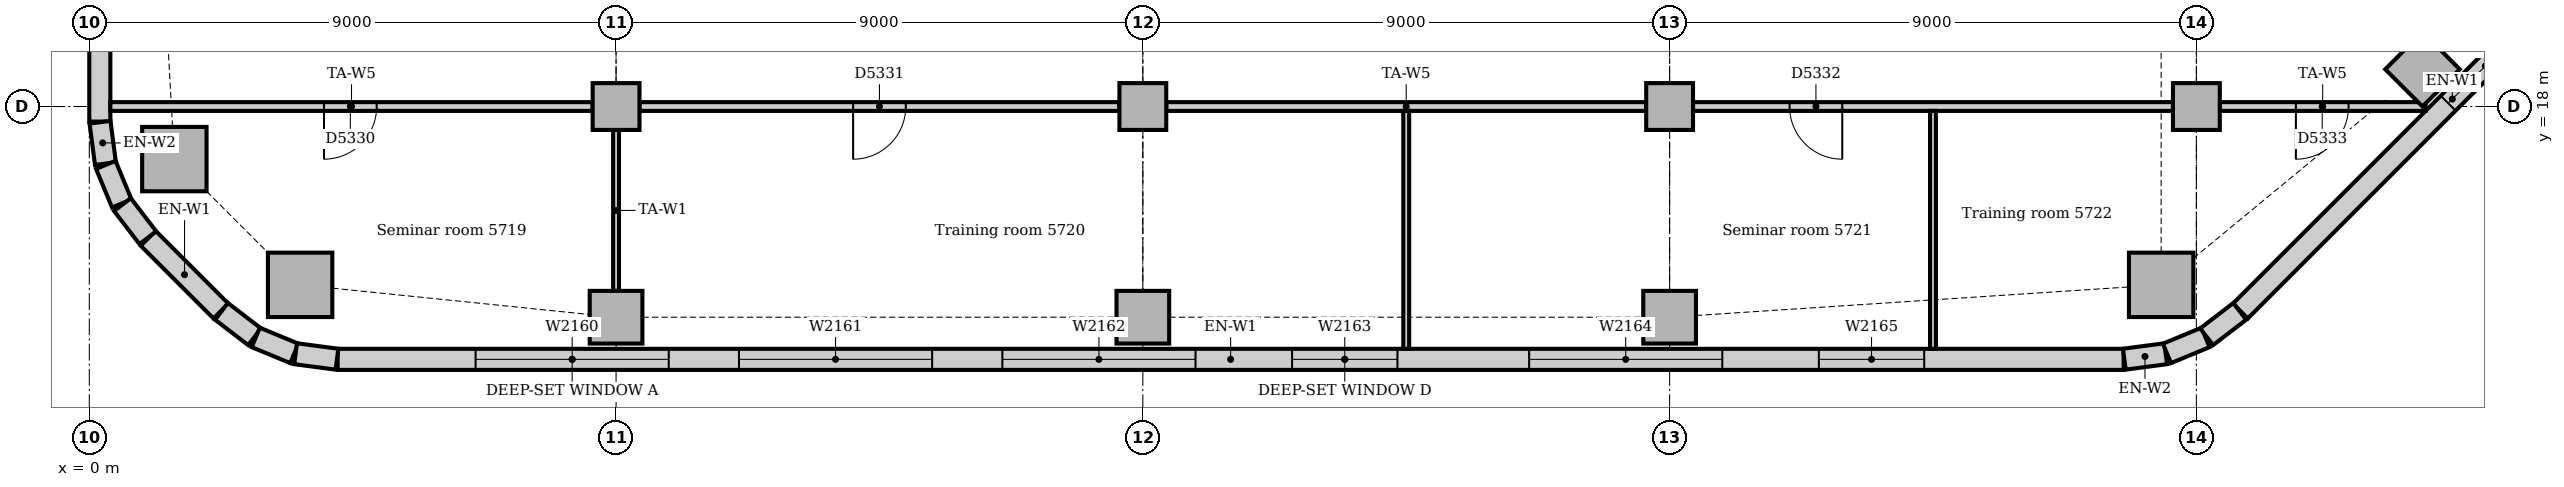
"""IFC4 building model, lengths in metres.
Left out: names, types, materials, properties, quantities, classifications, styles, units other than length and angle.
Written with IfcOpenShell. Run it as: python <this file> out.ifc"""

import sys

from ifc_helpers import new_model, si_unit, direction, frame, frame_2d, origin, origin_2d, place, context, subcontext, project, spatial, rectangle, extrude, element, fill, save


model = new_model("IFC4")
c1 = context("Model", 3, precision=1e-05, world=origin(), true_north=direction((0.0, 1.0)))
c2 = subcontext(c1, "Body", "Model", "MODEL_VIEW")
j1 = project(units=[si_unit("LENGTHUNIT", "METRE"), si_unit("PLANEANGLEUNIT", "RADIAN")], contexts=[c1])
p1 = place(None, origin())
s1 = spatial("IfcSite", under=j1, at=p1, CompositionType="ELEMENT")
p2 = place(p1, origin())
s2 = spatial("IfcBuilding", under=s1, at=p2, CompositionType="ELEMENT")
p3 = place(p2, frame((0.0, 0.0, 238.0)))
s3 = spatial("IfcBuildingStorey", under=s2, at=p3, CompositionType="ELEMENT", Elevation=238.0)
for number, where, z_axis, x_axis in (
    (1, (3.602, 14.953, 0.0), (0.0, 0.0, 1.0), (1.0, 0.0, 0.0)),
    (2, (35.398, 14.953, 0.0), (0.0, 0.0, 1.0), (1.0, 0.0, 0.0)),
    (3, (1.453, 17.102, 0.0), (0.0, 0.0, 1.0), (1.0, 0.0, 0.0)),
):
    element("IfcColumn", number, at=place(p3, frame(where, z_axis=z_axis, x_axis=x_axis)), inside=s3, PredefinedType="COLUMN", context=c2, shape_type="SweptSolid", body=[
        extrude(rectangle(XDim=1.1, YDim=1.1, at=origin_2d()), origin(), (0.0, 0.0, 1.0), 3.7),
    ])
for number, where, z_axis, x_axis in (
    (4, (9.0, 14.4, 0.0), (0.0, 0.0, 1.0), (1.0, 0.0, 0.0)),
    (5, (18.0, 14.4, 0.0), (0.0, 0.0, 1.0), (1.0, 0.0, 0.0)),
    (6, (27.0, 14.4, 0.0), (0.0, 0.0, 1.0), (1.0, 0.0, 0.0)),
    (7, (39.864, 18.636, 0.0), (0.0, 0.0, 1.0), (0.707, 0.707, 0.0)),
):
    element("IfcColumn", number, at=place(p3, frame(where, z_axis=z_axis, x_axis=x_axis)), inside=s3, PredefinedType="COLUMN", context=c2, shape_type="SweptSolid", body=[
        extrude(rectangle(XDim=0.9, YDim=0.9, at=origin_2d()), origin(), (0.0, 0.0, 1.0), 3.7),
    ])
for number, where, z_axis, x_axis in (
    (8, (9.0, 18.0, 0.0), (0.0, 0.0, 1.0), (1.0, 0.0, 0.0)),
    (9, (18.0, 18.0, 0.0), (0.0, 0.0, 1.0), (1.0, 0.0, 0.0)),
    (10, (27.0, 18.0, 0.0), (0.0, 0.0, 1.0), (1.0, 0.0, 0.0)),
    (11, (36.0, 18.0, 0.0), (0.0, 0.0, 1.0), (1.0, 0.0, 0.0)),
):
    element("IfcColumn", number, at=place(p3, frame(where, z_axis=z_axis, x_axis=x_axis)), inside=s3, PredefinedType="COLUMN", context=c2, shape_type="SweptSolid", body=[
        extrude(rectangle(XDim=0.8, YDim=0.8, at=origin_2d()), origin(), (0.0, 0.0, 1.0), 3.7),
    ])
p4 = place(p3, frame((4.243, 13.68, 0.0), z_axis=(0.0, 0.0, 1.0), x_axis=(1.0, 0.0, 0.0)))
e12 = element("IfcWall", 12, at=p4, inside=s3, PredefinedType="STANDARD", context=c2, shape_type="SweptSolid", body=[
    extrude(rectangle(XDim=30.515, YDim=0.36, at=frame_2d((15.257, 0.0))), origin(), (0.0, 0.0, 1.0), 3.7),
])
p5 = place(p4, frame((2.357, 0.0, 0.9)))
e13 = element("IfcOpeningElement", 13, at=p5, cuts=e12, PredefinedType="OPENING", context=c2, shape_type="SweptSolid", body=[
    extrude(rectangle(XDim=3.3, YDim=1.6, at=frame_2d((1.65, 0.8))), frame((0.0, 0.19, 0.0), z_axis=(0.0, -1.0, 0.0), x_axis=(1.0, 0.0, 0.0)), (0.0, 0.0, 1.0), 0.38),
])
p6 = place(p4, frame((6.857, 0.0, 0.9)))
e14 = element("IfcOpeningElement", 14, at=p6, cuts=e12, PredefinedType="OPENING", context=c2, shape_type="SweptSolid", body=[
    extrude(rectangle(XDim=3.3, YDim=1.6, at=frame_2d((1.65, 0.8))), frame((0.0, 0.19, 0.0), z_axis=(0.0, -1.0, 0.0), x_axis=(1.0, 0.0, 0.0)), (0.0, 0.0, 1.0), 0.38),
])
p7 = place(p4, frame((11.357, 0.0, 0.9)))
e15 = element("IfcOpeningElement", 15, at=p7, cuts=e12, PredefinedType="OPENING", context=c2, shape_type="SweptSolid", body=[
    extrude(rectangle(XDim=3.3, YDim=1.6, at=frame_2d((1.65, 0.8))), frame((0.0, 0.19, 0.0), z_axis=(0.0, -1.0, 0.0), x_axis=(1.0, 0.0, 0.0)), (0.0, 0.0, 1.0), 0.38),
])
p8 = place(p4, frame((16.307, 0.0, 0.9)))
e16 = element("IfcOpeningElement", 16, at=p8, cuts=e12, PredefinedType="OPENING", context=c2, shape_type="SweptSolid", body=[
    extrude(rectangle(XDim=1.8, YDim=1.6, at=frame_2d((0.9, 0.8))), frame((0.0, 0.19, 0.0), z_axis=(0.0, -1.0, 0.0), x_axis=(1.0, 0.0, 0.0)), (0.0, 0.0, 1.0), 0.38),
])
p9 = place(p4, frame((20.357, 0.0, 0.9)))
e17 = element("IfcOpeningElement", 17, at=p9, cuts=e12, PredefinedType="OPENING", context=c2, shape_type="SweptSolid", body=[
    extrude(rectangle(XDim=3.3, YDim=1.6, at=frame_2d((1.65, 0.8))), frame((0.0, 0.19, 0.0), z_axis=(0.0, -1.0, 0.0), x_axis=(1.0, 0.0, 0.0)), (0.0, 0.0, 1.0), 0.38),
])
p10 = place(p4, frame((25.307, 0.0, 0.9)))
e18 = element("IfcOpeningElement", 18, at=p10, cuts=e12, PredefinedType="OPENING", context=c2, shape_type="SweptSolid", body=[
    extrude(rectangle(XDim=1.8, YDim=1.6, at=frame_2d((0.9, 0.8))), frame((0.0, 0.19, 0.0), z_axis=(0.0, -1.0, 0.0), x_axis=(1.0, 0.0, 0.0)), (0.0, 0.0, 1.0), 0.38),
])
p11 = place(p3, frame((36.751, 14.506, 0.0), z_axis=(0.0, 0.0, 1.0), x_axis=(0.707106781187, 0.707106781187, 0.0)))
e19 = element("IfcWall", 19, at=p11, inside=s3, PredefinedType="STANDARD", context=c2, shape_type="SweptSolid", body=[
    extrude(rectangle(XDim=10.243, YDim=0.36, at=frame_2d((5.121, 0.0))), origin(), (0.0, 0.0, 1.0), 3.7),
])
p12 = place(p11, frame((5.021, 0.0, 0.9)))
e20 = element("IfcOpeningElement", 20, at=p12, cuts=e19, PredefinedType="OPENING", context=c2, shape_type="SweptSolid", body=[
    extrude(rectangle(XDim=1.8, YDim=1.6, at=frame_2d((0.9, 0.8))), frame((0.0, 0.19, 0.0), z_axis=(0.0, -1.0, 0.0), x_axis=(1.0, 0.0, 0.0)), (0.0, 0.0, 1.0), 0.38),
])
p13 = place(p3, frame((0.18, 21.0, 0.0), z_axis=(0.0, 0.0, 1.0), x_axis=(0.0, -1.0, 0.0)))
e21 = element("IfcWall", 21, at=p13, inside=s3, PredefinedType="STANDARD", context=c2, shape_type="SweptSolid", body=[
    extrude(rectangle(XDim=3.257, YDim=0.36, at=frame_2d((1.629, 0.0))), origin(), (0.0, 0.0, 1.0), 3.7),
])
p14 = place(p3, frame((1.006, 15.749, 0.0), z_axis=(0.0, 0.0, 1.0), x_axis=(0.707106781187, -0.707106781187, 0.0)))
e22 = element("IfcWall", 22, at=p14, inside=s3, PredefinedType="STANDARD", context=c2, shape_type="SweptSolid", body=[
    extrude(rectangle(XDim=1.757, YDim=0.36, at=frame_2d((0.879, 0.0))), origin(), (0.0, 0.0, 1.0), 3.7),
])
for number, where, z_axis, x_axis in (
    (23, (34.769, 13.683, 0.0), (0.0, 0.0, 1.0), (0.991, 0.131, 0.0)),
    (24, (35.497, 13.782, 0.0), (0.0, 0.0, 1.0), (0.924, 0.383, 0.0)),
):
    element("IfcWall", number, at=place(p3, frame(where, z_axis=z_axis, x_axis=x_axis)), inside=s3, PredefinedType="STANDARD", context=c2, shape_type="SweptSolid", body=[
        extrude(rectangle(XDim=0.713, YDim=0.36, at=frame_2d((0.356, 0.0))), origin(), (0.0, 0.0, 1.0), 3.7),
    ])
p15 = place(p3, frame((36.175, 14.066, 0.0), z_axis=(0.0, 0.0, 1.0), x_axis=(0.793321924995, 0.608802368033, 0.0)))
e25 = element("IfcWall", 25, at=p15, inside=s3, PredefinedType="STANDARD", context=c2, shape_type="SweptSolid", body=[
    extrude(rectangle(XDim=0.713, YDim=0.36, at=frame_2d((0.357, 0.0))), origin(), (0.0, 0.0, 1.0), 3.7),
])
for number, where, z_axis, x_axis in (
    (26, (0.183, 17.731, 0.0), (0.0, 0.0, 1.0), (0.131, -0.991, 0.0)),
    (27, (0.282, 17.003, 0.0), (0.0, 0.0, 1.0), (0.383, -0.924, 0.0)),
):
    element("IfcWall", number, at=place(p3, frame(where, z_axis=z_axis, x_axis=x_axis)), inside=s3, PredefinedType="STANDARD", context=c2, shape_type="SweptSolid", body=[
        extrude(rectangle(XDim=0.713, YDim=0.36, at=frame_2d((0.356, 0.0))), origin(), (0.0, 0.0, 1.0), 3.7),
    ])
for number, where, z_axis, x_axis in (
    (28, (0.566, 16.325, 0.0), (0.0, 0.0, 1.0), (0.609, -0.793, 0.0)),
    (29, (2.259, 14.5, 0.0), (0.0, 0.0, 1.0), (0.793, -0.609, 0.0)),
):
    element("IfcWall", number, at=place(p3, frame(where, z_axis=z_axis, x_axis=x_axis)), inside=s3, PredefinedType="STANDARD", context=c2, shape_type="SweptSolid", body=[
        extrude(rectangle(XDim=0.713, YDim=0.36, at=frame_2d((0.357, 0.0))), origin(), (0.0, 0.0, 1.0), 3.7),
    ])
for number, where, z_axis, x_axis in (
    (30, (2.844, 14.055, 0.0), (0.0, 0.0, 1.0), (0.924, -0.383, 0.0)),
    (31, (3.524, 13.776, 0.0), (0.0, 0.0, 1.0), (0.991, -0.131, 0.0)),
):
    element("IfcWall", number, at=place(p3, frame(where, z_axis=z_axis, x_axis=x_axis)), inside=s3, PredefinedType="STANDARD", context=c2, shape_type="SweptSolid", body=[
        extrude(rectangle(XDim=0.713, YDim=0.36, at=frame_2d((0.356, 0.0))), origin(), (0.0, 0.0, 1.0), 3.7),
    ])
p16 = place(p3, frame((36.4, 18.0, 0.0), z_axis=(0.0, 0.0, 1.0), x_axis=(1.0, 0.0, 0.0)))
e32 = element("IfcWall", 32, at=p16, inside=s3, PredefinedType="PARTITIONING", context=c2, shape_type="SweptSolid", body=[
    extrude(rectangle(XDim=3.516, YDim=0.15, at=frame_2d((1.758, 0.0))), origin(), (0.0, 0.0, 1.0), 3.452),
])
p17 = place(p16, frame((1.3, 0.0, 0.0)))
e33 = element("IfcOpeningElement", 33, at=p17, cuts=e32, PredefinedType="OPENING", context=c2, shape_type="SweptSolid", body=[
    extrude(rectangle(XDim=0.9, YDim=2.1, at=frame_2d((0.45, 1.05))), frame((0.0, 0.085, 0.0), z_axis=(0.0, -1.0, 0.0), x_axis=(1.0, 0.0, 0.0)), (0.0, 0.0, 1.0), 0.17),
])
p18 = place(p3, frame((27.4, 18.0, 0.0), z_axis=(0.0, 0.0, 1.0), x_axis=(1.0, 0.0, 0.0)))
e34 = element("IfcWall", 34, at=p18, inside=s3, PredefinedType="PARTITIONING", context=c2, shape_type="SweptSolid", body=[
    extrude(rectangle(XDim=8.2, YDim=0.15, at=frame_2d((4.1, 0.0))), origin(), (0.0, 0.0, 1.0), 3.104),
])
p19 = place(p18, frame((1.65, 0.0, 0.0)))
e35 = element("IfcOpeningElement", 35, at=p19, cuts=e34, PredefinedType="OPENING", context=c2, shape_type="SweptSolid", body=[
    extrude(rectangle(XDim=0.9, YDim=2.1, at=frame_2d((0.45, 1.05))), frame((0.0, 0.085, 0.0), z_axis=(0.0, -1.0, 0.0), x_axis=(1.0, 0.0, 0.0)), (0.0, 0.0, 1.0), 0.17),
])
p20 = place(p3, frame((18.4, 18.0, 0.0), z_axis=(0.0, 0.0, 1.0), x_axis=(1.0, 0.0, 0.0)))
e36 = element("IfcWall", 36, at=p20, inside=s3, PredefinedType="PARTITIONING", context=c2, shape_type="SweptSolid", body=[
    extrude(rectangle(XDim=8.2, YDim=0.15, at=frame_2d((4.1, 0.0))), origin(), (0.0, 0.0, 1.0), 3.104),
])
p21 = place(p3, frame((9.4, 18.0, 0.0), z_axis=(0.0, 0.0, 1.0), x_axis=(1.0, 0.0, 0.0)))
e37 = element("IfcWall", 37, at=p21, inside=s3, PredefinedType="PARTITIONING", context=c2, shape_type="SweptSolid", body=[
    extrude(rectangle(XDim=8.2, YDim=0.15, at=frame_2d((4.1, 0.0))), origin(), (0.0, 0.0, 1.0), 3.104),
])
p22 = place(p21, frame((3.65, 0.0, 0.0)))
e38 = element("IfcOpeningElement", 38, at=p22, cuts=e37, PredefinedType="OPENING", context=c2, shape_type="SweptSolid", body=[
    extrude(rectangle(XDim=0.9, YDim=2.1, at=frame_2d((0.45, 1.05))), frame((0.0, 0.085, 0.0), z_axis=(0.0, -1.0, 0.0), x_axis=(1.0, 0.0, 0.0)), (0.0, 0.0, 1.0), 0.17),
])
p23 = place(p3, frame((0.36, 18.0, 0.0), z_axis=(0.0, 0.0, 1.0), x_axis=(1.0, 0.0, 0.0)))
e39 = element("IfcWall", 39, at=p23, inside=s3, PredefinedType="PARTITIONING", context=c2, shape_type="SweptSolid", body=[
    extrude(rectangle(XDim=8.24, YDim=0.15, at=frame_2d((4.12, 0.0))), origin(), (0.0, 0.0, 1.0), 3.104),
])
p24 = place(p23, frame((3.65, 0.0, 0.0)))
e40 = element("IfcOpeningElement", 40, at=p24, cuts=e39, PredefinedType="OPENING", context=c2, shape_type="SweptSolid", body=[
    extrude(rectangle(XDim=0.9, YDim=2.1, at=frame_2d((0.45, 1.05))), frame((0.0, 0.085, 0.0), z_axis=(0.0, -1.0, 0.0), x_axis=(1.0, 0.0, 0.0)), (0.0, 0.0, 1.0), 0.17),
])
p25 = place(p3, frame((9.0, 14.85, 0.0), z_axis=(0.0, 0.0, 1.0), x_axis=(0.0, 1.0, 0.0)))
e41 = element("IfcWall", 41, at=p25, inside=s3, PredefinedType="PARTITIONING", context=c2, shape_type="SweptSolid", body=[
    extrude(rectangle(XDim=2.75, YDim=0.1, at=frame_2d((1.375, 0.0))), origin(), (0.0, 0.0, 1.0), 3.502),
])
for number, where, z_axis, x_axis in (
    (42, (22.5, 13.86, 0.0), (0.0, 0.0, 1.0), (0.0, 1.0, 0.0)),
    (43, (31.5, 13.86, 0.0), (0.0, 0.0, 1.0), (0.0, 1.0, 0.0)),
):
    element("IfcWall", number, at=place(p3, frame(where, z_axis=z_axis, x_axis=x_axis)), inside=s3, PredefinedType="PARTITIONING", context=c2, shape_type="SweptSolid", body=[
        extrude(rectangle(XDim=4.065, YDim=0.1, at=frame_2d((2.033, 0.0))), origin(), (0.0, 0.0, 1.0), 3.7),
    ])
p26 = place(p5, origin())
e44 = element("IfcWindow", 44, at=p26, inside=s3, PartitioningType="SINGLE_PANEL", PredefinedType="WINDOW", context=c2, shape_type="SweptSolid", body=[
    extrude(rectangle(XDim=3.3, YDim=1.6, at=frame_2d((1.65, 0.8))), frame((0.0, 0.13, 0.0), z_axis=(0.0, -1.0, 0.0), x_axis=(1.0, 0.0, 0.0)), (0.0, 0.0, 1.0), 0.06),
])
fill(e13, e44)
p27 = place(p6, origin())
e45 = element("IfcWindow", 45, at=p27, inside=s3, PartitioningType="SINGLE_PANEL", PredefinedType="WINDOW", context=c2, shape_type="SweptSolid", body=[
    extrude(rectangle(XDim=3.3, YDim=1.6, at=frame_2d((1.65, 0.8))), frame((0.0, 0.13, 0.0), z_axis=(0.0, -1.0, 0.0), x_axis=(1.0, 0.0, 0.0)), (0.0, 0.0, 1.0), 0.06),
])
fill(e14, e45)
p28 = place(p7, origin())
e46 = element("IfcWindow", 46, at=p28, inside=s3, PartitioningType="SINGLE_PANEL", PredefinedType="WINDOW", context=c2, shape_type="SweptSolid", body=[
    extrude(rectangle(XDim=3.3, YDim=1.6, at=frame_2d((1.65, 0.8))), frame((0.0, 0.13, 0.0), z_axis=(0.0, -1.0, 0.0), x_axis=(1.0, 0.0, 0.0)), (0.0, 0.0, 1.0), 0.06),
])
fill(e15, e46)
p29 = place(p8, origin())
e47 = element("IfcWindow", 47, at=p29, inside=s3, PartitioningType="SINGLE_PANEL", PredefinedType="WINDOW", context=c2, shape_type="SweptSolid", body=[
    extrude(rectangle(XDim=1.8, YDim=1.6, at=frame_2d((0.9, 0.8))), frame((0.0, 0.13, 0.0), z_axis=(0.0, -1.0, 0.0), x_axis=(1.0, 0.0, 0.0)), (0.0, 0.0, 1.0), 0.06),
])
fill(e16, e47)
p30 = place(p9, origin())
e48 = element("IfcWindow", 48, at=p30, inside=s3, PartitioningType="SINGLE_PANEL", PredefinedType="WINDOW", context=c2, shape_type="SweptSolid", body=[
    extrude(rectangle(XDim=3.3, YDim=1.6, at=frame_2d((1.65, 0.8))), frame((0.0, 0.13, 0.0), z_axis=(0.0, -1.0, 0.0), x_axis=(1.0, 0.0, 0.0)), (0.0, 0.0, 1.0), 0.06),
])
fill(e17, e48)
p31 = place(p10, origin())
e49 = element("IfcWindow", 49, at=p31, inside=s3, PartitioningType="SINGLE_PANEL", PredefinedType="WINDOW", context=c2, shape_type="SweptSolid", body=[
    extrude(rectangle(XDim=1.8, YDim=1.6, at=frame_2d((0.9, 0.8))), frame((0.0, 0.13, 0.0), z_axis=(0.0, -1.0, 0.0), x_axis=(1.0, 0.0, 0.0)), (0.0, 0.0, 1.0), 0.06),
])
fill(e18, e49)
p32 = place(p12, origin())
e50 = element("IfcWindow", 50, at=p32, inside=s3, PartitioningType="SINGLE_PANEL", PredefinedType="WINDOW", context=c2, shape_type="SweptSolid", body=[
    extrude(rectangle(XDim=1.8, YDim=1.6, at=frame_2d((0.9, 0.8))), frame((0.0, 0.13, 0.0), z_axis=(0.0, -1.0, 0.0), x_axis=(1.0, 0.0, 0.0)), (0.0, 0.0, 1.0), 0.06),
])
fill(e20, e50)
p33 = place(p24, frame((0.9, 0.0, 0.0), z_axis=(0.0, 0.0, 1.0), x_axis=(-1.0, 0.0, 0.0)))
e51 = element("IfcDoor", 51, at=p33, inside=s3, OperationType="SINGLE_SWING_RIGHT", PredefinedType="DOOR", context=c2, shape_type="SweptSolid", body=[
    extrude(rectangle(XDim=0.9, YDim=2.1, at=frame_2d((0.45, 1.05))), frame((0.0, 0.025, 0.0), z_axis=(0.0, -1.0, 0.0), x_axis=(1.0, 0.0, 0.0)), (0.0, 0.0, 1.0), 0.05),
])
fill(e40, e51)
p34 = place(p22, frame((0.9, 0.0, 0.0), z_axis=(0.0, 0.0, 1.0), x_axis=(-1.0, 0.0, 0.0)))
e52 = element("IfcDoor", 52, at=p34, inside=s3, OperationType="SINGLE_SWING_RIGHT", PredefinedType="DOOR", context=c2, shape_type="SweptSolid", body=[
    extrude(rectangle(XDim=0.9, YDim=2.1, at=frame_2d((0.45, 1.05))), frame((0.0, 0.025, 0.0), z_axis=(0.0, -1.0, 0.0), x_axis=(1.0, 0.0, 0.0)), (0.0, 0.0, 1.0), 0.05),
])
fill(e38, e52)
p35 = place(p19, frame((0.9, 0.0, 0.0), z_axis=(0.0, 0.0, 1.0), x_axis=(-1.0, 0.0, 0.0)))
e53 = element("IfcDoor", 53, at=p35, inside=s3, OperationType="SINGLE_SWING_LEFT", PredefinedType="DOOR", context=c2, shape_type="SweptSolid", body=[
    extrude(rectangle(XDim=0.9, YDim=2.1, at=frame_2d((0.45, 1.05))), frame((0.0, 0.025, 0.0), z_axis=(0.0, -1.0, 0.0), x_axis=(1.0, 0.0, 0.0)), (0.0, 0.0, 1.0), 0.05),
])
fill(e35, e53)
p36 = place(p17, frame((0.9, 0.0, 0.0), z_axis=(0.0, 0.0, 1.0), x_axis=(-1.0, 0.0, 0.0)))
e54 = element("IfcDoor", 54, at=p36, inside=s3, OperationType="SINGLE_SWING_RIGHT", PredefinedType="DOOR", context=c2, shape_type="SweptSolid", body=[
    extrude(rectangle(XDim=0.9, YDim=2.1, at=frame_2d((0.45, 1.05))), frame((0.0, 0.025, 0.0), z_axis=(0.0, -1.0, 0.0), x_axis=(1.0, 0.0, 0.0)), (0.0, 0.0, 1.0), 0.05),
])
fill(e33, e54)
save(model, sys.argv[1])
